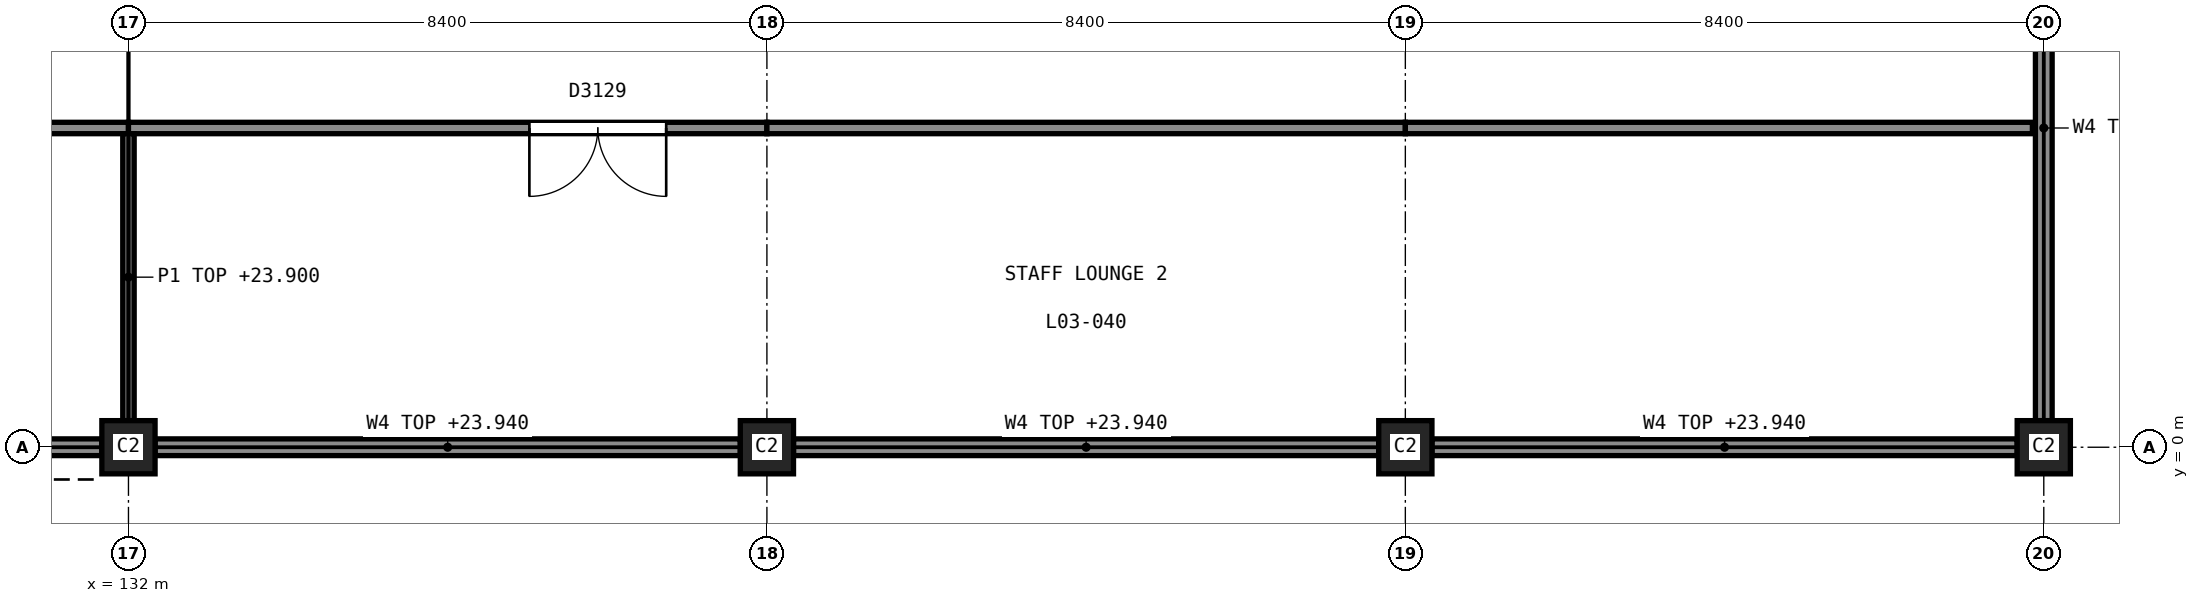
"""IFC4 building model, lengths in metres.
Left out: names, types, materials, properties, quantities, classifications, styles, units other than length and angle.
Written with IfcOpenShell. Run it as: python <this file> out.ifc"""

import sys

from ifc_helpers import new_model, si_unit, direction, frame, frame_2d, origin, origin_2d, place, context, subcontext, project, spatial, rectangle, extrude, element, fill, save


model = new_model("IFC4")
c1 = context("Model", 3, precision=1e-05, world=origin(), true_north=direction((0.0, 1.0)))
c2 = subcontext(c1, "Body", "Model", "MODEL_VIEW")
j1 = project(units=[si_unit("LENGTHUNIT", "METRE"), si_unit("PLANEANGLEUNIT", "RADIAN")], contexts=[c1])
p1 = place(None, origin())
s1 = spatial("IfcSite", under=j1, at=p1, CompositionType="ELEMENT")
p2 = place(p1, origin())
s2 = spatial("IfcBuilding", under=s1, at=p2, CompositionType="ELEMENT")
p3 = place(p2, frame((0.0, 0.0, 20.0)))
s3 = spatial("IfcBuildingStorey", under=s2, at=p3, CompositionType="ELEMENT", Elevation=20.0)
for number, where, z_axis, x_axis in (
    (1, (132.0, 0.0, 0.0), (0.0, 0.0, 1.0), (1.0, 0.0, 0.0)),
    (2, (140.4, 0.0, 0.0), (0.0, 0.0, 1.0), (1.0, 0.0, 0.0)),
    (3, (148.8, 0.0, 0.0), (0.0, 0.0, 1.0), (1.0, 0.0, 0.0)),
    (4, (157.2, 0.0, 0.0), (0.0, 0.0, 1.0), (1.0, 0.0, 0.0)),
):
    element("IfcColumn", number, at=place(p3, frame(where, z_axis=z_axis, x_axis=x_axis)), inside=s3, PredefinedType="COLUMN", context=c2, shape_type="SweptSolid", body=[
        extrude(rectangle(XDim=0.7, YDim=0.7, at=origin_2d()), origin(), (0.0, 0.0, 1.0), 5.0),
    ])
for number, where, z_axis, x_axis in (
    (5, (123.95, 0.0, 0.0), (0.0, 0.0, 1.0), (1.0, 0.0, 0.0)),
    (6, (132.35, 0.0, 0.0), (0.0, 0.0, 1.0), (1.0, 0.0, 0.0)),
    (7, (140.75, 0.0, 0.0), (0.0, 0.0, 1.0), (1.0, 0.0, 0.0)),
):
    element("IfcWall", number, at=place(p3, frame(where, z_axis=z_axis, x_axis=x_axis)), inside=s3, PredefinedType="SOLIDWALL", context=c2, shape_type="SweptSolid", body=[
        extrude(rectangle(XDim=7.7, YDim=0.22, at=frame_2d((3.85, 0.0))), origin(), (0.0, 0.0, 1.0), 3.94),
    ])
p4 = place(p3, frame((149.15, 0.0, 0.0), z_axis=(0.0, 0.0, 1.0), x_axis=(1.0, 0.0, 0.0)))
e8 = element("IfcWall", 8, at=p4, inside=s3, PredefinedType="SOLIDWALL", context=c2, shape_type="SweptSolid", body=[
    extrude(rectangle(XDim=7.7, YDim=0.22, at=frame_2d((3.85, 0.0))), origin(), (0.0, 0.0, 1.0), 3.94),
])
p5 = place(p3, frame((157.2, 0.35, 0.0), z_axis=(0.0, 0.0, 1.0), x_axis=(0.0, 1.0, 0.0)))
e9 = element("IfcWall", 9, at=p5, inside=s3, PredefinedType="SOLIDWALL", context=c2, shape_type="SweptSolid", body=[
    extrude(rectangle(XDim=7.7, YDim=0.22, at=frame_2d((3.85, 0.0))), origin(), (0.0, 0.0, 1.0), 3.94),
])
p6 = place(p3, frame((123.6, 4.2, 0.0), z_axis=(0.0, 0.0, 1.0), x_axis=(1.0, 0.0, 0.0)))
e10 = element("IfcWall", 10, at=p6, inside=s3, PredefinedType="PARTITIONING", context=c2, shape_type="SweptSolid", body=[
    extrude(rectangle(XDim=8.4, YDim=0.15, at=frame_2d((4.2, 0.0))), origin(), (0.0, 0.0, 1.0), 3.9),
])
p7 = place(p3, frame((132.0, 4.2, 0.0), z_axis=(0.0, 0.0, 1.0), x_axis=(1.0, 0.0, 0.0)))
e11 = element("IfcWall", 11, at=p7, inside=s3, PredefinedType="PARTITIONING", context=c2, shape_type="SweptSolid", body=[
    extrude(rectangle(XDim=8.4, YDim=0.15, at=frame_2d((4.2, 0.0))), origin(), (0.0, 0.0, 1.0), 3.9),
])
p8 = place(p7, frame((5.275, 0.0, 0.0)))
e12 = element("IfcOpeningElement", 12, at=p8, cuts=e11, PredefinedType="OPENING", context=c2, shape_type="SweptSolid", body=[
    extrude(rectangle(XDim=1.8, YDim=2.1, at=frame_2d((0.9, 1.05))), frame((0.0, 0.085, 0.0), z_axis=(0.0, -1.0, 0.0), x_axis=(1.0, 0.0, 0.0)), (0.0, 0.0, 1.0), 0.17),
])
p9 = place(p3, frame((140.4, 4.2, 0.0), z_axis=(0.0, 0.0, 1.0), x_axis=(1.0, 0.0, 0.0)))
e13 = element("IfcWall", 13, at=p9, inside=s3, PredefinedType="PARTITIONING", context=c2, shape_type="SweptSolid", body=[
    extrude(rectangle(XDim=8.4, YDim=0.15, at=frame_2d((4.2, 0.0))), origin(), (0.0, 0.0, 1.0), 3.9),
])
p10 = place(p3, frame((148.8, 4.2, 0.0), z_axis=(0.0, 0.0, 1.0), x_axis=(1.0, 0.0, 0.0)))
e14 = element("IfcWall", 14, at=p10, inside=s3, PredefinedType="PARTITIONING", context=c2, shape_type="SweptSolid", body=[
    extrude(rectangle(XDim=8.25, YDim=0.15, at=frame_2d((4.125, 0.0))), origin(), (0.0, 0.0, 1.0), 3.9),
])
p11 = place(p3, frame((132.0, 0.35, 0.0), z_axis=(0.0, 0.0, 1.0), x_axis=(0.0, 1.0, 0.0)))
e15 = element("IfcWall", 15, at=p11, inside=s3, PredefinedType="PARTITIONING", context=c2, shape_type="SweptSolid", body=[
    extrude(rectangle(XDim=3.775, YDim=0.15, at=frame_2d((1.887, 0.0))), origin(), (0.0, 0.0, 1.0), 3.9),
])
p12 = place(p8, origin())
e16 = element("IfcDoor", 16, at=p12, inside=s3, OperationType="DOUBLE_DOOR_SINGLE_SWING", PredefinedType="DOOR", context=c2, shape_type="SweptSolid", body=[
    extrude(rectangle(XDim=1.8, YDim=2.1, at=frame_2d((0.9, 1.05))), frame((0.0, 0.025, 0.0), z_axis=(0.0, -1.0, 0.0), x_axis=(1.0, 0.0, 0.0)), (0.0, 0.0, 1.0), 0.05),
])
fill(e12, e16)
save(model, sys.argv[1])
